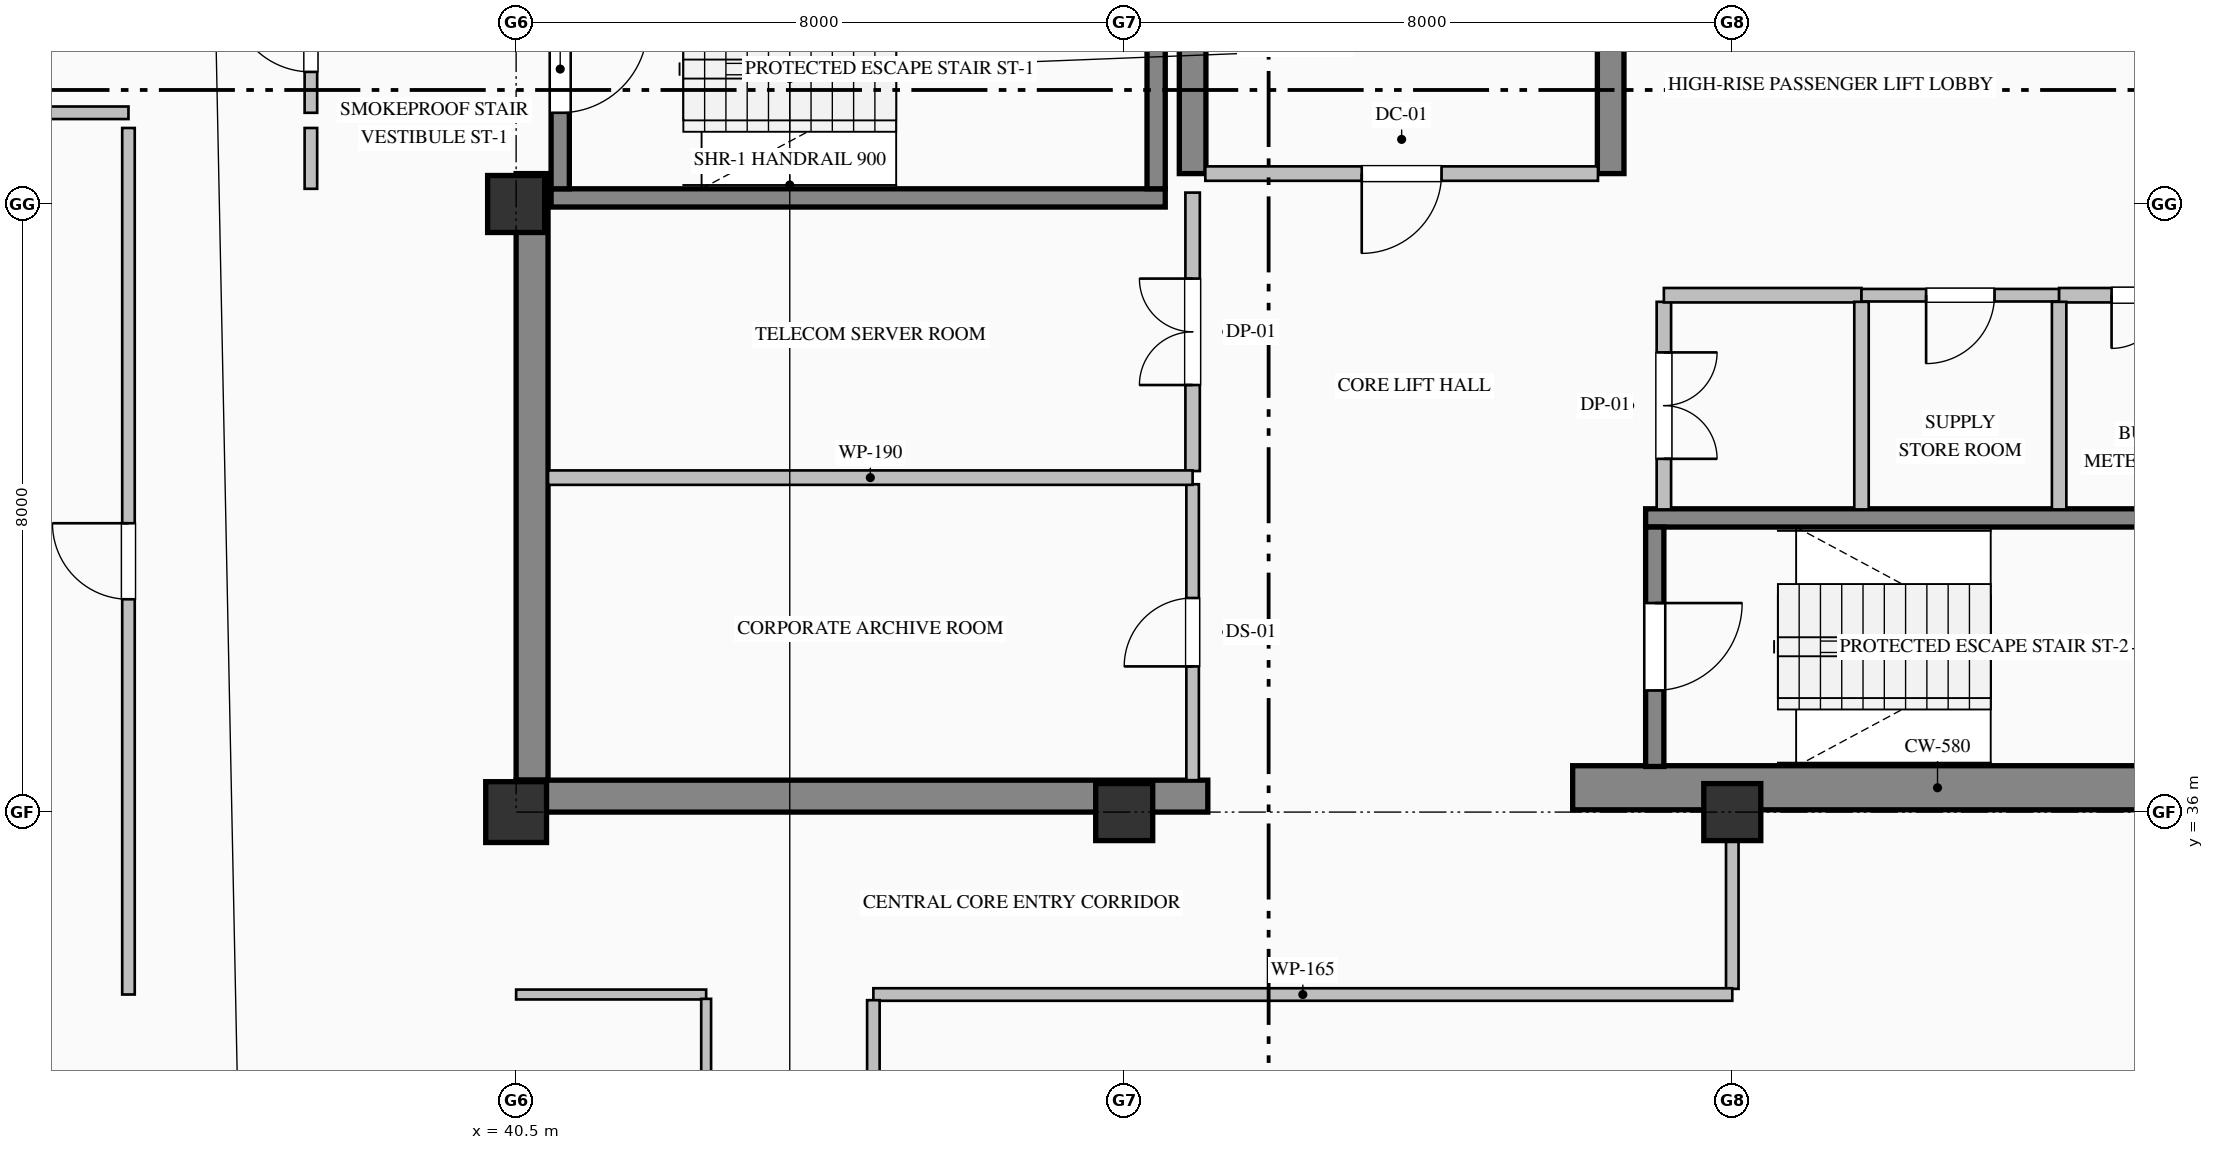
"""IFC4 building model, lengths in metres.
Left out: names, types, materials, properties, quantities, classifications, styles, units other than length and angle.
Written with IfcOpenShell. Run it as: python <this file> out.ifc"""

import sys

from ifc_helpers import new_model, si_unit, direction, frame, frame_2d, origin, origin_2d, place, context, subcontext, project, spatial, rectangle, hollow_rectangle, extrude, element, fill, save


model = new_model("IFC4")
c1 = context("Model", 3, precision=1e-05, world=origin(), true_north=direction((0.0, 1.0)))
c2 = subcontext(c1, "Body", "Model", "MODEL_VIEW")
j1 = project(units=[si_unit("LENGTHUNIT", "METRE"), si_unit("PLANEANGLEUNIT", "RADIAN")], contexts=[c1])
p1 = place(None, origin())
s1 = spatial("IfcSite", under=j1, at=p1, CompositionType="ELEMENT")
p2 = place(p1, origin())
s2 = spatial("IfcBuilding", under=s1, at=p2, CompositionType="ELEMENT")
p3 = place(p2, frame((0.0, 0.0, 323.2)))
s3 = spatial("IfcBuildingStorey", under=s2, at=p3, CompositionType="ELEMENT", Elevation=323.2)
p4 = place(p3, frame((40.71, 36.42, 0.0), z_axis=(0.0, 0.0, 1.0), x_axis=(0.0, 1.0, 0.0)))
e1 = element("IfcWall", 1, at=p4, inside=s3, PredefinedType="SHEAR", context=c2, shape_type="SweptSolid", body=[
    extrude(rectangle(XDim=7.98, YDim=0.42, at=frame_2d((3.99, 0.0))), origin(), (0.0, 0.0, 1.0), 3.785),
])
p5 = place(p3, frame((40.5, 36.21, 0.0), z_axis=(0.0, 0.0, 1.0), x_axis=(1.0, 0.0, 0.0)))
e2 = element("IfcWall", 2, at=p5, inside=s3, PredefinedType="SHEAR", context=c2, shape_type="SweptSolid", body=[
    extrude(rectangle(XDim=9.1, YDim=0.42, at=frame_2d((4.55, 0.0))), origin(), (0.0, 0.0, 1.0), 3.785),
])
p6 = place(p3, frame((54.4, 36.32, 0.0), z_axis=(0.0, 0.0, 1.0), x_axis=(1.0, 0.0, 0.0)))
e3 = element("IfcWall", 3, at=p6, inside=s3, PredefinedType="SHEAR", context=c2, shape_type="SweptSolid", body=[
    extrude(rectangle(XDim=9.6, YDim=0.58, at=frame_2d((4.8, 0.0))), origin(), (0.0, 0.0, 1.0), 4.0),
])
p7 = place(p3, frame((49.4, 44.4, 0.0), z_axis=(0.0, 0.0, 1.0), x_axis=(0.0, 1.0, 0.0)))
e4 = element("IfcWall", 4, at=p7, inside=s3, PredefinedType="SHEAR", context=c2, shape_type="SweptSolid", body=[
    extrude(rectangle(XDim=3.0, YDim=0.35, at=frame_2d((1.5, 0.0))), origin(), (0.0, 0.0, 1.0), 3.785),
])
p8 = place(p3, frame((54.9, 44.4, 0.0), z_axis=(0.0, 0.0, 1.0), x_axis=(0.0, 1.0, 0.0)))
e5 = element("IfcWall", 5, at=p8, inside=s3, PredefinedType="SHEAR", context=c2, shape_type="SweptSolid", body=[
    extrude(rectangle(XDim=7.18, YDim=0.35, at=frame_2d((3.59, 0.0))), origin(), (0.0, 0.0, 1.0), 3.785),
])
p9 = place(p3, frame((40.5, 36.0, 0.0), z_axis=(0.0, 0.0, 1.0), x_axis=(1.0, 0.0, 0.0)))
e6 = element("IfcColumn", 6, at=p9, inside=s3, PredefinedType="COLUMN", context=c2, shape_type="SweptSolid", body=[
    extrude(hollow_rectangle(XDim=0.8, YDim=0.8, WallThickness=0.032, at=origin_2d()), origin(), (0.0, 0.0, 1.0), 4.0),
])
for number, where, z_axis, x_axis in (
    (7, (40.5, 44.0, 0.0), (0.0, 0.0, 1.0), (1.0, 0.0, 0.0)),
    (8, (48.5, 36.0, 0.0), (0.0, 0.0, 1.0), (1.0, 0.0, 0.0)),
    (9, (56.5, 36.0, 0.0), (0.0, 0.0, 1.0), (1.0, 0.0, 0.0)),
):
    element("IfcColumn", number, at=place(p3, frame(where, z_axis=z_axis, x_axis=x_axis)), inside=s3, PredefinedType="COLUMN", context=c2, shape_type="SweptSolid", body=[
        extrude(rectangle(XDim=0.75, YDim=0.75, at=origin_2d()), origin(), (0.0, 0.0, 1.0), 4.0),
    ])
p10 = place(p3, frame((49.04, 44.08, 0.0), z_axis=(0.0, 0.0, 1.0), x_axis=(-1.0, 0.0, 0.0)))
e10 = element("IfcWall", 10, at=p10, inside=s3, PredefinedType="SOLIDWALL", context=c2, shape_type="SweptSolid", body=[
    extrude(rectangle(XDim=8.08, YDim=0.24, at=frame_2d((4.04, 0.0))), origin(), (0.0, 0.0, 1.0), 4.0),
])
p11 = place(p3, frame((41.08, 47.35, 0.0), z_axis=(0.0, 0.0, 1.0), x_axis=(0.0, -1.0, 0.0)))
e11 = element("IfcWall", 11, at=p11, inside=s3, PredefinedType="SOLIDWALL", context=c2, shape_type="SweptSolid", body=[
    extrude(rectangle(XDim=3.15, YDim=0.24, at=frame_2d((1.575, 0.0))), origin(), (0.0, 0.0, 1.0), 4.0),
])
p12 = place(p11, frame((1.0, 0.0, 0.0)))
e12 = element("IfcOpeningElement", 12, at=p12, cuts=e11, PredefinedType="OPENING", context=c2, shape_type="SweptSolid", body=[
    extrude(rectangle(XDim=1.15, YDim=2.2, at=frame_2d((0.575, 1.1))), frame((0.0, 0.13, 0.0), z_axis=(0.0, -1.0, 0.0), x_axis=(1.0, 0.0, 0.0)), (0.0, 0.0, 1.0), 0.26),
])
p13 = place(p3, frame((48.92, 44.2, 0.0), z_axis=(0.0, 0.0, 1.0), x_axis=(0.0, 1.0, 0.0)))
e13 = element("IfcWall", 13, at=p13, inside=s3, PredefinedType="SOLIDWALL", context=c2, shape_type="SweptSolid", body=[
    extrude(rectangle(XDim=3.15, YDim=0.24, at=frame_2d((1.575, 0.0))), origin(), (0.0, 0.0, 1.0), 4.0),
])
p14 = place(p3, frame((55.36, 39.87, 0.0), z_axis=(0.0, 0.0, 1.0), x_axis=(1.0, 0.0, 0.0)))
e14 = element("IfcWall", 14, at=p14, inside=s3, PredefinedType="SOLIDWALL", context=c2, shape_type="SweptSolid", body=[
    extrude(rectangle(XDim=8.08, YDim=0.24, at=frame_2d((4.04, 0.0))), origin(), (0.0, 0.0, 1.0), 4.0),
])
p15 = place(p3, frame((55.48, 39.75, 0.0), z_axis=(0.0, 0.0, 1.0), x_axis=(0.0, -1.0, 0.0)))
e15 = element("IfcWall", 15, at=p15, inside=s3, PredefinedType="SOLIDWALL", context=c2, shape_type="SweptSolid", body=[
    extrude(rectangle(XDim=3.15, YDim=0.24, at=frame_2d((1.575, 0.0))), origin(), (0.0, 0.0, 1.0), 4.0),
])
p16 = place(p15, frame((1.0, 0.0, 0.0)))
e16 = element("IfcOpeningElement", 16, at=p16, cuts=e15, PredefinedType="OPENING", context=c2, shape_type="SweptSolid", body=[
    extrude(rectangle(XDim=1.15, YDim=2.2, at=frame_2d((0.575, 1.1))), frame((0.0, 0.13, 0.0), z_axis=(0.0, -1.0, 0.0), x_axis=(1.0, 0.0, 0.0)), (0.0, 0.0, 1.0), 0.26),
])
p17 = place(p3, frame((37.8, 45.2, 0.0), z_axis=(0.0, 0.0, 1.0), x_axis=(0.0, 1.0, 0.0)))
e17 = element("IfcWall", 17, at=p17, inside=s3, PredefinedType="PARTITIONING", context=c2, shape_type="SweptSolid", body=[
    extrude(rectangle(XDim=2.125, YDim=0.165, at=frame_2d((1.063, 0.0))), origin(), (0.0, 0.0, 1.0), 3.785),
])
p18 = place(p17, frame((0.538, 0.0, 0.0)))
e18 = element("IfcOpeningElement", 18, at=p18, cuts=e17, PredefinedType="OPENING", context=c2, shape_type="SweptSolid", body=[
    extrude(rectangle(XDim=1.05, YDim=2.15, at=frame_2d((0.525, 1.075))), frame((0.0, 0.093, 0.0), z_axis=(0.0, -1.0, 0.0), x_axis=(1.0, 0.0, 0.0)), (0.0, 0.0, 1.0), 0.185),
])
p19 = place(p3, frame((37.8, 44.2, 0.0), z_axis=(0.0, 0.0, 1.0), x_axis=(0.0, 1.0, 0.0)))
e19 = element("IfcWall", 19, at=p19, inside=s3, PredefinedType="PARTITIONING", context=c2, shape_type="SweptSolid", body=[
    extrude(rectangle(XDim=0.8, YDim=0.165, at=frame_2d((0.4, 0.0))), origin(), (0.0, 0.0, 1.0), 3.785),
])
p20 = place(p3, frame((54.733, 44.4, 0.0), z_axis=(0.0, 0.0, 1.0), x_axis=(-1.0, 0.0, 0.0)))
e20 = element("IfcWall", 20, at=p20, inside=s3, PredefinedType="PARTITIONING", context=c2, shape_type="SweptSolid", body=[
    extrude(rectangle(XDim=5.166, YDim=0.19, at=frame_2d((2.583, 0.0))), origin(), (0.0, 0.0, 1.0), 3.785),
])
p21 = place(p20, frame((2.058, 0.0, 0.0)))
e21 = element("IfcOpeningElement", 21, at=p21, cuts=e20, PredefinedType="OPENING", context=c2, shape_type="SweptSolid", body=[
    extrude(rectangle(XDim=1.05, YDim=2.15, at=frame_2d((0.525, 1.075))), frame((0.0, 0.105, 0.0), z_axis=(0.0, -1.0, 0.0), x_axis=(1.0, 0.0, 0.0)), (0.0, 0.0, 1.0), 0.21),
])
p22 = place(p3, frame((49.4, 36.42, 0.0), z_axis=(0.0, 0.0, 1.0), x_axis=(0.0, 1.0, 0.0)))
e22 = element("IfcWall", 22, at=p22, inside=s3, PredefinedType="PARTITIONING", context=c2, shape_type="SweptSolid", body=[
    extrude(rectangle(XDim=3.893, YDim=0.165, at=frame_2d((1.947, 0.0))), origin(), (0.0, 0.0, 1.0), 3.027),
])
p23 = place(p22, frame((1.497, 0.0, 0.0)))
e23 = element("IfcOpeningElement", 23, at=p23, cuts=e22, PredefinedType="OPENING", context=c2, shape_type="SweptSolid", body=[
    extrude(rectangle(XDim=0.9, YDim=2.15, at=frame_2d((0.45, 1.075))), frame((0.0, 0.093, 0.0), z_axis=(0.0, -1.0, 0.0), x_axis=(1.0, 0.0, 0.0)), (0.0, 0.0, 1.0), 0.185),
])
p24 = place(p3, frame((49.4, 40.487, 0.0), z_axis=(0.0, 0.0, 1.0), x_axis=(0.0, 1.0, 0.0)))
e24 = element("IfcWall", 24, at=p24, inside=s3, PredefinedType="PARTITIONING", context=c2, shape_type="SweptSolid", body=[
    extrude(rectangle(XDim=3.663, YDim=0.19, at=frame_2d((1.832, 0.0))), origin(), (0.0, 0.0, 1.0), 3.027),
])
p25 = place(p24, frame((1.132, 0.0, 0.0)))
e25 = element("IfcOpeningElement", 25, at=p25, cuts=e24, PredefinedType="OPENING", context=c2, shape_type="SweptSolid", body=[
    extrude(rectangle(XDim=1.4, YDim=2.25, at=frame_2d((0.7, 1.125))), frame((0.0, 0.105, 0.0), z_axis=(0.0, -1.0, 0.0), x_axis=(1.0, 0.0, 0.0)), (0.0, 0.0, 1.0), 0.21),
])
p26 = place(p3, frame((55.6, 42.713, 0.0), z_axis=(0.0, 0.0, 1.0), x_axis=(0.0, -1.0, 0.0)))
e26 = element("IfcWall", 26, at=p26, inside=s3, PredefinedType="PARTITIONING", context=c2, shape_type="SweptSolid", body=[
    extrude(rectangle(XDim=2.731, YDim=0.19, at=frame_2d((1.365, 0.0))), origin(), (0.0, 0.0, 1.0), 3.785),
])
p27 = place(p26, frame((0.666, 0.0, 0.0)))
e27 = element("IfcOpeningElement", 27, at=p27, cuts=e26, PredefinedType="OPENING", context=c2, shape_type="SweptSolid", body=[
    extrude(rectangle(XDim=1.4, YDim=2.25, at=frame_2d((0.7, 1.125))), frame((0.0, 0.105, 0.0), z_axis=(0.0, -1.0, 0.0), x_axis=(1.0, 0.0, 0.0)), (0.0, 0.0, 1.0), 0.21),
])
p28 = place(p3, frame((40.92, 40.4, 0.0), z_axis=(0.0, 0.0, 1.0), x_axis=(1.0, 0.0, 0.0)))
e28 = element("IfcWall", 28, at=p28, inside=s3, PredefinedType="PARTITIONING", context=c2, shape_type="SweptSolid", body=[
    extrude(rectangle(XDim=8.48, YDim=0.19, at=frame_2d((4.24, 0.0))), origin(), (0.0, 0.0, 1.0), 3.785),
])
p29 = place(p3, frame((58.2, 42.8, 0.0), z_axis=(0.0, 0.0, 1.0), x_axis=(-1.0, 0.0, 0.0)))
e29 = element("IfcWall", 29, at=p29, inside=s3, PredefinedType="PARTITIONING", context=c2, shape_type="SweptSolid", body=[
    extrude(rectangle(XDim=2.6, YDim=0.19, at=frame_2d((1.3, 0.0))), origin(), (0.0, 0.0, 1.0), 3.785),
])
p30 = place(p3, frame((60.8, 42.8, 0.0), z_axis=(0.0, 0.0, 1.0), x_axis=(-1.0, 0.0, 0.0)))
e30 = element("IfcWall", 30, at=p30, inside=s3, PredefinedType="PARTITIONING", context=c2, shape_type="SweptSolid", body=[
    extrude(rectangle(XDim=2.6, YDim=0.165, at=frame_2d((1.3, 0.0))), origin(), (0.0, 0.0, 1.0), 3.785),
])
p31 = place(p30, frame((0.85, 0.0, 0.0)))
e31 = element("IfcOpeningElement", 31, at=p31, cuts=e30, PredefinedType="OPENING", context=c2, shape_type="SweptSolid", body=[
    extrude(rectangle(XDim=0.9, YDim=2.15, at=frame_2d((0.45, 1.075))), frame((0.0, 0.093, 0.0), z_axis=(0.0, -1.0, 0.0), x_axis=(1.0, 0.0, 0.0)), (0.0, 0.0, 1.0), 0.185),
])
p32 = place(p3, frame((63.58, 42.8, 0.0), z_axis=(0.0, 0.0, 1.0), x_axis=(-1.0, 0.0, 0.0)))
e32 = element("IfcWall", 32, at=p32, inside=s3, PredefinedType="PARTITIONING", context=c2, shape_type="SweptSolid", body=[
    extrude(rectangle(XDim=2.78, YDim=0.19, at=frame_2d((1.39, 0.0))), origin(), (0.0, 0.0, 1.0), 3.785),
])
p33 = place(p32, frame((0.69, 0.0, 0.0)))
e33 = element("IfcOpeningElement", 33, at=p33, cuts=e32, PredefinedType="OPENING", context=c2, shape_type="SweptSolid", body=[
    extrude(rectangle(XDim=1.4, YDim=2.25, at=frame_2d((0.7, 1.125))), frame((0.0, 0.105, 0.0), z_axis=(0.0, -1.0, 0.0), x_axis=(1.0, 0.0, 0.0)), (0.0, 0.0, 1.0), 0.21),
])
for number, where, z_axis, x_axis in (
    (34, (58.2, 42.713, 0.0), (0.0, 0.0, 1.0), (0.0, -1.0, 0.0)),
    (35, (60.8, 42.713, 0.0), (0.0, 0.0, 1.0), (0.0, -1.0, 0.0)),
):
    element("IfcWall", number, at=place(p3, frame(where, z_axis=z_axis, x_axis=x_axis)), inside=s3, PredefinedType="PARTITIONING", context=c2, shape_type="SweptSolid", body=[
        extrude(rectangle(XDim=2.731, YDim=0.19, at=frame_2d((1.365, 0.0))), origin(), (0.0, 0.0, 1.0), 3.785),
    ])
p34 = place(p3, frame((35.4, 45.2, 0.0), z_axis=(0.0, 0.0, 1.0), x_axis=(-1.0, 0.0, 0.0)))
e36 = element("IfcWall", 36, at=p34, inside=s3, PredefinedType="PARTITIONING", context=c2, shape_type="SweptSolid", body=[
    extrude(rectangle(XDim=4.4, YDim=0.165, at=frame_2d((2.2, 0.0))), origin(), (0.0, 0.0, 1.0), 3.785),
])
p35 = place(p3, frame((35.4, 33.6, 0.0), z_axis=(0.0, 0.0, 1.0), x_axis=(0.0, 1.0, 0.0)))
e37 = element("IfcWall", 37, at=p35, inside=s3, PredefinedType="PARTITIONING", context=c2, shape_type="SweptSolid", body=[
    extrude(rectangle(XDim=11.4, YDim=0.165, at=frame_2d((5.7, 0.0))), origin(), (0.0, 0.0, 1.0), 3.785),
])
p36 = place(p35, frame((5.2, 0.0, 0.0)))
e38 = element("IfcOpeningElement", 38, at=p36, cuts=e37, PredefinedType="OPENING", context=c2, shape_type="SweptSolid", body=[
    extrude(rectangle(XDim=1.0, YDim=2.15, at=frame_2d((0.5, 1.075))), frame((0.0, 0.093, 0.0), z_axis=(0.0, -1.0, 0.0), x_axis=(1.0, 0.0, 0.0)), (0.0, 0.0, 1.0), 0.185),
])
p37 = place(p3, frame((56.5, 36.0, 0.0), z_axis=(0.0, 0.0, 1.0), x_axis=(0.0, -1.0, 0.0)))
e39 = element("IfcWall", 39, at=p37, inside=s3, PredefinedType="PARTITIONING", context=c2, shape_type="SweptSolid", body=[
    extrude(rectangle(XDim=2.325, YDim=0.165, at=frame_2d((1.163, 0.0))), origin(), (0.0, 0.0, 1.0), 3.177),
])
p38 = place(p3, frame((56.5, 33.6, 0.0), z_axis=(0.0, 0.0, 1.0), x_axis=(-1.0, 0.0, 0.0)))
e40 = element("IfcWall", 40, at=p38, inside=s3, PredefinedType="PARTITIONING", context=c2, shape_type="SweptSolid", body=[
    extrude(rectangle(XDim=11.3, YDim=0.165, at=frame_2d((5.65, 0.0))), origin(), (0.0, 0.0, 1.0), 3.785),
])
p39 = place(p3, frame((43.0, 33.6, 0.0), z_axis=(0.0, 0.0, 1.0), x_axis=(-1.0, 0.0, 0.0)))
e41 = element("IfcWall", 41, at=p39, inside=s3, PredefinedType="PARTITIONING", context=c2, shape_type="SweptSolid", body=[
    extrude(rectangle(XDim=2.5, YDim=0.13, at=frame_2d((1.25, 0.0))), origin(), (0.0, 0.0, 1.0), 3.785),
])
p40 = place(p3, frame((45.2, 33.525, 0.0), z_axis=(0.0, 0.0, 1.0), x_axis=(0.0, -1.0, 0.0)))
e42 = element("IfcWall", 42, at=p40, inside=s3, PredefinedType="PARTITIONING", context=c2, shape_type="SweptSolid", body=[
    extrude(rectangle(XDim=8.451, YDim=0.165, at=frame_2d((4.226, 0.0))), origin(), (0.0, 0.0, 1.0), 3.785),
])
p41 = place(p3, frame((43.0, 22.875, 0.0), z_axis=(0.0, 0.0, 1.0), x_axis=(0.0, 1.0, 0.0)))
e43 = element("IfcWall", 43, at=p41, inside=s3, PredefinedType="PARTITIONING", context=c2, shape_type="SweptSolid", body=[
    extrude(rectangle(XDim=10.668, YDim=0.13, at=frame_2d((5.334, 0.0))), origin(), (0.0, 0.0, 1.0), 3.785),
])
p42 = place(p41, frame((4.834, 0.0, 0.0)))
e44 = element("IfcOpeningElement", 44, at=p42, cuts=e43, PredefinedType="OPENING", context=c2, shape_type="SweptSolid", body=[
    extrude(rectangle(XDim=1.0, YDim=2.15, at=frame_2d((0.5, 1.075))), frame((0.0, 0.075, 0.0), z_axis=(0.0, -1.0, 0.0), x_axis=(1.0, 0.0, 0.0)), (0.0, 0.0, 1.0), 0.15),
])
p43 = place(p12, origin())
e45 = element("IfcDoor", 45, at=p43, inside=s3, OperationType="SINGLE_SWING_LEFT", PredefinedType="DOOR", context=c2, shape_type="SweptSolid", body=[
    extrude(rectangle(XDim=1.15, YDim=2.2, at=frame_2d((0.575, 1.1))), frame((0.0, 0.025, 0.0), z_axis=(0.0, -1.0, 0.0), x_axis=(1.0, 0.0, 0.0)), (0.0, 0.0, 1.0), 0.05),
])
fill(e12, e45)
p44 = place(p16, origin())
e46 = element("IfcDoor", 46, at=p44, inside=s3, OperationType="SINGLE_SWING_LEFT", PredefinedType="DOOR", context=c2, shape_type="SweptSolid", body=[
    extrude(rectangle(XDim=1.15, YDim=2.2, at=frame_2d((0.575, 1.1))), frame((0.0, 0.025, 0.0), z_axis=(0.0, -1.0, 0.0), x_axis=(1.0, 0.0, 0.0)), (0.0, 0.0, 1.0), 0.05),
])
fill(e16, e46)
p45 = place(p21, origin())
e47 = element("IfcDoor", 47, at=p45, inside=s3, OperationType="SINGLE_SWING_RIGHT", PredefinedType="DOOR", context=c2, shape_type="SweptSolid", body=[
    extrude(rectangle(XDim=1.05, YDim=2.15, at=frame_2d((0.525, 1.075))), frame((0.0, 0.025, 0.0), z_axis=(0.0, -1.0, 0.0), x_axis=(1.0, 0.0, 0.0)), (0.0, 0.0, 1.0), 0.05),
])
fill(e21, e47)
p46 = place(p18, origin())
e48 = element("IfcDoor", 48, at=p46, inside=s3, OperationType="SINGLE_SWING_RIGHT", PredefinedType="DOOR", context=c2, shape_type="SweptSolid", body=[
    extrude(rectangle(XDim=1.05, YDim=2.15, at=frame_2d((0.525, 1.075))), frame((0.0, 0.025, 0.0), z_axis=(0.0, -1.0, 0.0), x_axis=(1.0, 0.0, 0.0)), (0.0, 0.0, 1.0), 0.05),
])
fill(e18, e48)
p47 = place(p23, origin())
e49 = element("IfcDoor", 49, at=p47, inside=s3, OperationType="SINGLE_SWING_LEFT", PredefinedType="DOOR", context=c2, shape_type="SweptSolid", body=[
    extrude(rectangle(XDim=0.9, YDim=2.15, at=frame_2d((0.45, 1.075))), frame((0.0, 0.025, 0.0), z_axis=(0.0, -1.0, 0.0), x_axis=(1.0, 0.0, 0.0)), (0.0, 0.0, 1.0), 0.05),
])
fill(e23, e49)
p48 = place(p25, origin())
e50 = element("IfcDoor", 50, at=p48, inside=s3, OperationType="DOUBLE_DOOR_SINGLE_SWING", PredefinedType="DOOR", context=c2, shape_type="SweptSolid", body=[
    extrude(rectangle(XDim=1.4, YDim=2.25, at=frame_2d((0.7, 1.125))), frame((0.0, 0.025, 0.0), z_axis=(0.0, -1.0, 0.0), x_axis=(1.0, 0.0, 0.0)), (0.0, 0.0, 1.0), 0.05),
])
fill(e25, e50)
p49 = place(p27, origin())
e51 = element("IfcDoor", 51, at=p49, inside=s3, OperationType="DOUBLE_DOOR_SINGLE_SWING", PredefinedType="DOOR", context=c2, shape_type="SweptSolid", body=[
    extrude(rectangle(XDim=1.4, YDim=2.25, at=frame_2d((0.7, 1.125))), frame((0.0, 0.025, 0.0), z_axis=(0.0, -1.0, 0.0), x_axis=(1.0, 0.0, 0.0)), (0.0, 0.0, 1.0), 0.05),
])
fill(e27, e51)
p50 = place(p31, origin())
e52 = element("IfcDoor", 52, at=p50, inside=s3, OperationType="SINGLE_SWING_RIGHT", PredefinedType="DOOR", context=c2, shape_type="SweptSolid", body=[
    extrude(rectangle(XDim=0.9, YDim=2.15, at=frame_2d((0.45, 1.075))), frame((0.0, 0.025, 0.0), z_axis=(0.0, -1.0, 0.0), x_axis=(1.0, 0.0, 0.0)), (0.0, 0.0, 1.0), 0.05),
])
fill(e31, e52)
p51 = place(p33, origin())
e53 = element("IfcDoor", 53, at=p51, inside=s3, OperationType="DOUBLE_DOOR_SINGLE_SWING", PredefinedType="DOOR", context=c2, shape_type="SweptSolid", body=[
    extrude(rectangle(XDim=1.4, YDim=2.25, at=frame_2d((0.7, 1.125))), frame((0.0, 0.025, 0.0), z_axis=(0.0, -1.0, 0.0), x_axis=(1.0, 0.0, 0.0)), (0.0, 0.0, 1.0), 0.05),
])
fill(e33, e53)
p52 = place(p36, origin())
e54 = element("IfcDoor", 54, at=p52, inside=s3, OperationType="SINGLE_SWING_RIGHT", PredefinedType="DOOR", context=c2, shape_type="SweptSolid", body=[
    extrude(rectangle(XDim=1.0, YDim=2.15, at=frame_2d((0.5, 1.075))), frame((0.0, 0.025, 0.0), z_axis=(0.0, -1.0, 0.0), x_axis=(1.0, 0.0, 0.0)), (0.0, 0.0, 1.0), 0.05),
])
fill(e38, e54)
save(model, sys.argv[1])
